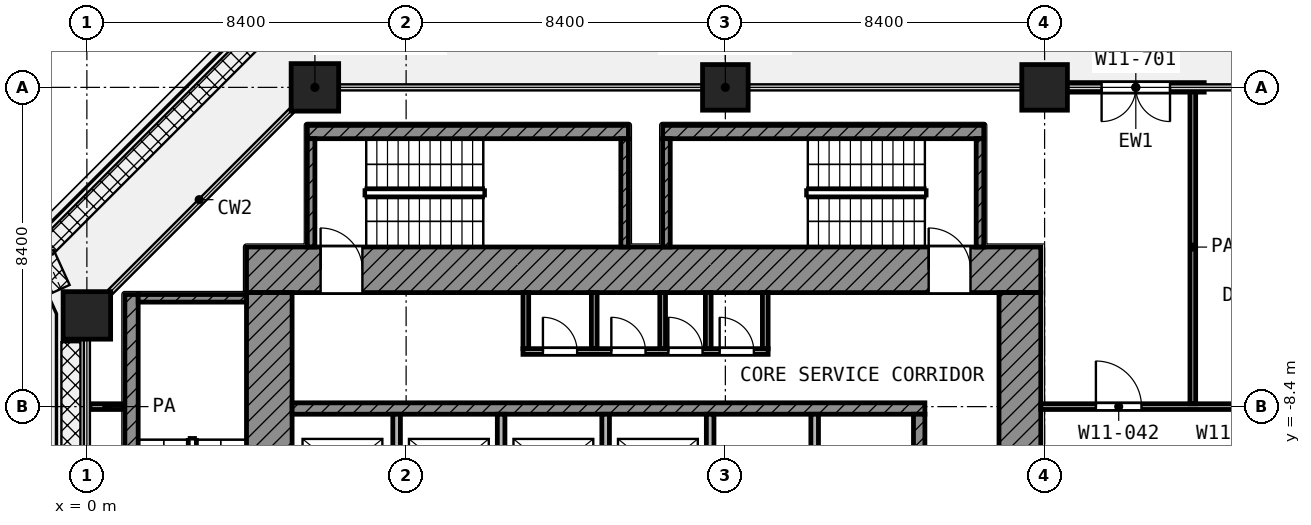
"""IFC4 building model, lengths in metres.
Left out: names, types, materials, properties, quantities, classifications, styles, units other than length and angle.
Written with IfcOpenShell. Run it as: python <this file> out.ifc"""

import sys

from ifc_helpers import new_model, si_unit, direction, frame, frame_2d, origin, origin_2d, place, context, subcontext, project, spatial, rectangle, extrude, element, fill, save


model = new_model("IFC4")
c1 = context("Model", 3, precision=1e-05, world=origin(), true_north=direction((0.0, 1.0)))
c2 = subcontext(c1, "Body", "Model", "MODEL_VIEW")
j1 = project(units=[si_unit("LENGTHUNIT", "METRE"), si_unit("PLANEANGLEUNIT", "RADIAN")], contexts=[c1])
p1 = place(None, origin())
s1 = spatial("IfcSite", under=j1, at=p1, CompositionType="ELEMENT")
p2 = place(p1, origin())
s2 = spatial("IfcBuilding", under=s1, at=p2, CompositionType="ELEMENT")
p3 = place(p2, frame((0.0, 0.0, 72.8)))
s3 = spatial("IfcBuildingStorey", under=s2, at=p3, CompositionType="ELEMENT", Elevation=72.8)
p4 = place(p3, frame((6.0, 0.0, 0.0), z_axis=(0.0, 0.0, 1.0), x_axis=(1.0, 0.0, 0.0)))
e1 = element("IfcColumn", 1, at=p4, inside=s3, PredefinedType="COLUMN", context=c2, shape_type="SweptSolid", body=[
    extrude(rectangle(XDim=1.25, YDim=1.25, at=origin_2d()), origin(), (0.0, 0.0, 1.0), 4.2),
])
for number, where, z_axis, x_axis in (
    (2, (16.8, 0.0, 0.0), (0.0, 0.0, 1.0), (1.0, 0.0, 0.0)),
    (3, (25.2, 0.0, 0.0), (0.0, 0.0, 1.0), (1.0, 0.0, 0.0)),
):
    element("IfcColumn", number, at=place(p3, frame(where, z_axis=z_axis, x_axis=x_axis)), inside=s3, PredefinedType="COLUMN", context=c2, shape_type="SweptSolid", body=[
        extrude(rectangle(XDim=1.2, YDim=1.2, at=origin_2d()), origin(), (0.0, 0.0, 1.0), 4.2),
    ])
p5 = place(p3, frame((0.0, -6.0, 0.0), z_axis=(0.0, 0.0, 1.0), x_axis=(1.0, 0.0, 0.0)))
e4 = element("IfcColumn", 4, at=p5, inside=s3, PredefinedType="COLUMN", context=c2, shape_type="SweptSolid", body=[
    extrude(rectangle(XDim=1.25, YDim=1.25, at=origin_2d()), origin(), (0.0, 0.0, 1.0), 4.2),
])
p6 = place(p3, frame((29.4, 0.0, 0.0), z_axis=(0.0, 0.0, 1.0), x_axis=(-1.0, 0.0, 0.0)))
e5 = element("IfcWall", 5, at=p6, inside=s3, PredefinedType="SOLIDWALL", context=c2, shape_type="SweptSolid", body=[
    extrude(rectangle(XDim=3.6, YDim=0.25, at=frame_2d((1.8, 0.0))), origin(), (0.0, 0.0, 1.0), 3.78),
])
p7 = place(p6, frame((0.9, 0.0, 0.0)))
e6 = element("IfcOpeningElement", 6, at=p7, cuts=e5, PredefinedType="OPENING", context=c2, shape_type="SweptSolid", body=[
    extrude(rectangle(XDim=1.8, YDim=2.1, at=frame_2d((0.9, 1.05))), frame((0.0, 0.135, 0.0), z_axis=(0.0, -1.0, 0.0), x_axis=(1.0, 0.0, 0.0)), (0.0, 0.0, 1.0), 0.27),
])
p8 = place(p3, frame((4.2, -4.8, 0.0), z_axis=(0.0, 0.0, 1.0), x_axis=(1.0, 0.0, 0.0)))
e7 = element("IfcWall", 7, at=p8, inside=s3, PredefinedType="SHEAR", context=c2, shape_type="SweptSolid", body=[
    extrude(rectangle(XDim=20.9, YDim=1.2, at=frame_2d((10.45, 0.0))), origin(), (0.0, 0.0, 1.0), 3.9),
])
p9 = place(p8, frame((1.95, 0.0, 0.0)))
e8 = element("IfcOpeningElement", 8, at=p9, cuts=e7, PredefinedType="OPENING", context=c2, shape_type="SweptSolid", body=[
    extrude(rectangle(XDim=1.1, YDim=2.1, at=frame_2d((0.55, 1.05))), frame((0.0, 0.61, 0.0), z_axis=(0.0, -1.0, 0.0), x_axis=(1.0, 0.0, 0.0)), (0.0, 0.0, 1.0), 1.22),
])
p10 = place(p8, frame((17.95, 0.0, 0.0)))
e9 = element("IfcOpeningElement", 9, at=p10, cuts=e7, PredefinedType="OPENING", context=c2, shape_type="SweptSolid", body=[
    extrude(rectangle(XDim=1.1, YDim=2.1, at=frame_2d((0.55, 1.05))), frame((0.0, 0.61, 0.0), z_axis=(0.0, -1.0, 0.0), x_axis=(1.0, 0.0, 0.0)), (0.0, 0.0, 1.0), 1.22),
])
p11 = place(p3, frame((4.8, -25.1, 0.0), z_axis=(0.0, 0.0, 1.0), x_axis=(0.0, 1.0, 0.0)))
e10 = element("IfcWall", 10, at=p11, inside=s3, PredefinedType="SHEAR", context=c2, shape_type="SweptSolid", body=[
    extrude(rectangle(XDim=19.7, YDim=1.2, at=frame_2d((9.85, 0.0))), origin(), (0.0, 0.0, 1.0), 3.9),
])
p12 = place(p11, frame((11.55, 0.0, 0.0)))
e11 = element("IfcOpeningElement", 11, at=p12, cuts=e10, PredefinedType="OPENING", context=c2, shape_type="SweptSolid", body=[
    extrude(rectangle(XDim=1.1, YDim=2.1, at=frame_2d((0.55, 1.05))), frame((0.0, 0.61, 0.0), z_axis=(0.0, -1.0, 0.0), x_axis=(1.0, 0.0, 0.0)), (0.0, 0.0, 1.0), 1.22),
])
p13 = place(p11, frame((2.25, 0.0, 0.0)))
e12 = element("IfcOpeningElement", 12, at=p13, cuts=e10, PredefinedType="OPENING", context=c2, shape_type="SweptSolid", body=[
    extrude(rectangle(XDim=1.1, YDim=2.1, at=frame_2d((0.55, 1.05))), frame((0.0, 0.61, 0.0), z_axis=(0.0, -1.0, 0.0), x_axis=(1.0, 0.0, 0.0)), (0.0, 0.0, 1.0), 1.22),
])
p14 = place(p3, frame((24.55, -24.0, 0.0), z_axis=(0.0, 0.0, 1.0), x_axis=(0.0, 1.0, 0.0)))
e13 = element("IfcWall", 13, at=p14, inside=s3, PredefinedType="SHEAR", context=c2, shape_type="SweptSolid", body=[
    extrude(rectangle(XDim=18.6, YDim=1.1, at=frame_2d((9.3, 0.0))), origin(), (0.0, 0.0, 1.0), 3.9),
])
p15 = place(p14, frame((10.5, 0.0, 0.0)))
e14 = element("IfcOpeningElement", 14, at=p15, cuts=e13, PredefinedType="OPENING", context=c2, shape_type="SweptSolid", body=[
    extrude(rectangle(XDim=1.8, YDim=2.1, at=frame_2d((0.9, 1.05))), frame((0.0, 0.56, 0.0), z_axis=(0.0, -1.0, 0.0), x_axis=(1.0, 0.0, 0.0)), (0.0, 0.0, 1.0), 1.12),
])
p16 = place(p3, frame((5.4, -8.45, 0.0), z_axis=(0.0, 0.0, 1.0), x_axis=(1.0, 0.0, 0.0)))
e15 = element("IfcWall", 15, at=p16, inside=s3, PredefinedType="SHEAR", context=c2, shape_type="SweptSolid", body=[
    extrude(rectangle(XDim=16.65, YDim=0.3, at=frame_2d((8.325, 0.0))), origin(), (0.0, 0.0, 1.0), 3.9),
])
p17 = place(p3, frame((21.9, -10.95, 0.0), z_axis=(0.0, 0.0, 1.0), x_axis=(0.0, 1.0, 0.0)))
e16 = element("IfcWall", 16, at=p17, inside=s3, PredefinedType="SHEAR", context=c2, shape_type="SweptSolid", body=[
    extrude(rectangle(XDim=2.35, YDim=0.3, at=frame_2d((1.175, 0.0))), origin(), (0.0, 0.0, 1.0), 3.9),
])
for number, where, z_axis, x_axis in (
    (17, (8.15, -10.95, 0.0), (0.0, 0.0, 1.0), (0.0, 1.0, 0.0)),
    (18, (10.9, -10.95, 0.0), (0.0, 0.0, 1.0), (0.0, 1.0, 0.0)),
    (19, (13.65, -10.95, 0.0), (0.0, 0.0, 1.0), (0.0, 1.0, 0.0)),
    (20, (16.4, -10.95, 0.0), (0.0, 0.0, 1.0), (0.0, 1.0, 0.0)),
    (21, (19.15, -10.95, 0.0), (0.0, 0.0, 1.0), (0.0, 1.0, 0.0)),
):
    element("IfcWall", number, at=place(p3, frame(where, z_axis=z_axis, x_axis=x_axis)), inside=s3, PredefinedType="PARTITIONING", context=c2, shape_type="SweptSolid", body=[
        extrude(rectangle(XDim=2.35, YDim=0.2, at=frame_2d((1.175, 0.0))), origin(), (0.0, 0.0, 1.0), 3.9),
    ])
p18 = place(p3, frame((11.475, -6.95, 0.0), z_axis=(0.0, 0.0, 1.0), x_axis=(1.0, 0.0, 0.0)))
e22 = element("IfcWall", 22, at=p18, inside=s3, PredefinedType="PARTITIONING", context=c2, shape_type="SweptSolid", body=[
    extrude(rectangle(XDim=6.45, YDim=0.15, at=frame_2d((3.225, 0.0))), origin(), (0.0, 0.0, 1.0), 3.9),
])
p19 = place(p18, frame((0.525, 0.0, 0.0)))
e23 = element("IfcOpeningElement", 23, at=p19, cuts=e22, PredefinedType="OPENING", context=c2, shape_type="SweptSolid", body=[
    extrude(rectangle(XDim=0.9, YDim=2.1, at=frame_2d((0.45, 1.05))), frame((0.0, 0.085, 0.0), z_axis=(0.0, -1.0, 0.0), x_axis=(1.0, 0.0, 0.0)), (0.0, 0.0, 1.0), 0.17),
])
p20 = place(p18, frame((2.325, 0.0, 0.0)))
e24 = element("IfcOpeningElement", 24, at=p20, cuts=e22, PredefinedType="OPENING", context=c2, shape_type="SweptSolid", body=[
    extrude(rectangle(XDim=0.9, YDim=2.1, at=frame_2d((0.45, 1.05))), frame((0.0, 0.085, 0.0), z_axis=(0.0, -1.0, 0.0), x_axis=(1.0, 0.0, 0.0)), (0.0, 0.0, 1.0), 0.17),
])
p21 = place(p18, frame((3.825, 0.0, 0.0)))
e25 = element("IfcOpeningElement", 25, at=p21, cuts=e22, PredefinedType="OPENING", context=c2, shape_type="SweptSolid", body=[
    extrude(rectangle(XDim=0.9, YDim=2.1, at=frame_2d((0.45, 1.05))), frame((0.0, 0.085, 0.0), z_axis=(0.0, -1.0, 0.0), x_axis=(1.0, 0.0, 0.0)), (0.0, 0.0, 1.0), 0.17),
])
p22 = place(p18, frame((5.175, 0.0, 0.0)))
e26 = element("IfcOpeningElement", 26, at=p22, cuts=e22, PredefinedType="OPENING", context=c2, shape_type="SweptSolid", body=[
    extrude(rectangle(XDim=0.9, YDim=2.1, at=frame_2d((0.45, 1.05))), frame((0.0, 0.085, 0.0), z_axis=(0.0, -1.0, 0.0), x_axis=(1.0, 0.0, 0.0)), (0.0, 0.0, 1.0), 0.17),
])
for number, where, z_axis, x_axis in (
    (27, (11.55, -6.875, 0.0), (0.0, 0.0, 1.0), (0.0, 1.0, 0.0)),
    (28, (13.35, -6.875, 0.0), (0.0, 0.0, 1.0), (0.0, 1.0, 0.0)),
    (29, (15.15, -6.875, 0.0), (0.0, 0.0, 1.0), (0.0, 1.0, 0.0)),
    (30, (16.35, -6.875, 0.0), (0.0, 0.0, 1.0), (0.0, 1.0, 0.0)),
    (31, (17.85, -6.875, 0.0), (0.0, 0.0, 1.0), (0.0, 1.0, 0.0)),
):
    element("IfcWall", number, at=place(p3, frame(where, z_axis=z_axis, x_axis=x_axis)), inside=s3, PredefinedType="PARTITIONING", context=c2, shape_type="SweptSolid", body=[
        extrude(rectangle(XDim=1.475, YDim=0.15, at=frame_2d((0.738, 0.0))), origin(), (0.0, 0.0, 1.0), 3.9),
    ])
p23 = place(p3, frame((1.175, -13.9, 0.0), z_axis=(0.0, 0.0, 1.0), x_axis=(0.0, 1.0, 0.0)))
e32 = element("IfcWall", 32, at=p23, inside=s3, PredefinedType="SHEAR", context=c2, shape_type="SweptSolid", body=[
    extrude(rectangle(XDim=8.45, YDim=0.35, at=frame_2d((4.225, 0.0))), origin(), (0.0, 0.0, 1.0), 3.9),
])
p24 = place(p3, frame((1.35, -5.55, 0.0), z_axis=(0.0, 0.0, 1.0), x_axis=(1.0, 0.0, 0.0)))
e33 = element("IfcWall", 33, at=p24, inside=s3, PredefinedType="SHEAR", context=c2, shape_type="SweptSolid", body=[
    extrude(rectangle(XDim=2.85, YDim=0.2, at=frame_2d((1.425, 0.0))), origin(), (0.0, 0.0, 1.0), 3.9),
])
p25 = place(p3, frame((5.8, -1.175, 0.0), z_axis=(0.0, 0.0, 1.0), x_axis=(1.0, 0.0, 0.0)))
e34 = element("IfcWall", 34, at=p25, inside=s3, PredefinedType="SHEAR", context=c2, shape_type="SweptSolid", body=[
    extrude(rectangle(XDim=8.45, YDim=0.35, at=frame_2d((4.225, 0.0))), origin(), (0.0, 0.0, 1.0), 3.9),
])
for number, where, z_axis, x_axis in (
    (35, (5.9, -4.2, 0.0), (0.0, 0.0, 1.0), (0.0, 1.0, 0.0)),
    (36, (14.15, -4.2, 0.0), (0.0, 0.0, 1.0), (0.0, 1.0, 0.0)),
):
    element("IfcWall", number, at=place(p3, frame(where, z_axis=z_axis, x_axis=x_axis)), inside=s3, PredefinedType="SHEAR", context=c2, shape_type="SweptSolid", body=[
        extrude(rectangle(XDim=2.85, YDim=0.2, at=frame_2d((1.425, 0.0))), origin(), (0.0, 0.0, 1.0), 3.9),
    ])
p26 = place(p3, frame((15.15, -1.175, 0.0), z_axis=(0.0, 0.0, 1.0), x_axis=(1.0, 0.0, 0.0)))
e37 = element("IfcWall", 37, at=p26, inside=s3, PredefinedType="SHEAR", context=c2, shape_type="SweptSolid", body=[
    extrude(rectangle(XDim=8.45, YDim=0.35, at=frame_2d((4.225, 0.0))), origin(), (0.0, 0.0, 1.0), 3.9),
])
for number, where, z_axis, x_axis in (
    (38, (15.25, -4.2, 0.0), (0.0, 0.0, 1.0), (0.0, 1.0, 0.0)),
    (39, (23.5, -4.2, 0.0), (0.0, 0.0, 1.0), (0.0, 1.0, 0.0)),
):
    element("IfcWall", number, at=place(p3, frame(where, z_axis=z_axis, x_axis=x_axis)), inside=s3, PredefinedType="SHEAR", context=c2, shape_type="SweptSolid", body=[
        extrude(rectangle(XDim=2.85, YDim=0.2, at=frame_2d((1.425, 0.0))), origin(), (0.0, 0.0, 1.0), 3.9),
    ])
p27 = place(p3, frame((0.08, -8.4, 0.0), z_axis=(0.0, 0.0, 1.0), x_axis=(1.0, 0.0, 0.0)))
e40 = element("IfcWall", 40, at=p27, inside=s3, PredefinedType="PARTITIONING", context=c2, shape_type="SweptSolid", body=[
    extrude(rectangle(XDim=0.89, YDim=0.15, at=frame_2d((0.445, 0.0))), origin(), (0.0, 0.0, 1.0), 3.9),
])
p28 = place(p3, frame((25.1, -8.4, 0.0), z_axis=(0.0, 0.0, 1.0), x_axis=(1.0, 0.0, 0.0)))
e41 = element("IfcWall", 41, at=p28, inside=s3, PredefinedType="PARTITIONING", context=c2, shape_type="SweptSolid", body=[
    extrude(rectangle(XDim=14.932, YDim=0.15, at=frame_2d((7.466, 0.0))), origin(), (0.0, 0.0, 1.0), 3.9),
])
p29 = place(p28, frame((1.45, 0.0, 0.0)))
e42 = element("IfcOpeningElement", 42, at=p29, cuts=e41, PredefinedType="OPENING", context=c2, shape_type="SweptSolid", body=[
    extrude(rectangle(XDim=1.2, YDim=2.1, at=frame_2d((0.6, 1.05))), frame((0.0, 0.085, 0.0), z_axis=(0.0, -1.0, 0.0), x_axis=(1.0, 0.0, 0.0)), (0.0, 0.0, 1.0), 0.17),
])
p30 = place(p28, frame((5.75, 0.0, 0.0)))
e43 = element("IfcOpeningElement", 43, at=p30, cuts=e41, PredefinedType="OPENING", context=c2, shape_type="SweptSolid", body=[
    extrude(rectangle(XDim=1.0, YDim=2.1, at=frame_2d((0.5, 1.05))), frame((0.0, 0.085, 0.0), z_axis=(0.0, -1.0, 0.0), x_axis=(1.0, 0.0, 0.0)), (0.0, 0.0, 1.0), 0.17),
])
p31 = place(p28, frame((9.2, 0.0, 0.0)))
e44 = element("IfcOpeningElement", 44, at=p31, cuts=e41, PredefinedType="OPENING", context=c2, shape_type="SweptSolid", body=[
    extrude(rectangle(XDim=1.2, YDim=2.1, at=frame_2d((0.6, 1.05))), frame((0.0, 0.085, 0.0), z_axis=(0.0, -1.0, 0.0), x_axis=(1.0, 0.0, 0.0)), (0.0, 0.0, 1.0), 0.17),
])
p32 = place(p3, frame((29.1, -8.325, 0.0), z_axis=(0.0, 0.0, 1.0), x_axis=(0.0, 1.0, 0.0)))
e45 = element("IfcWall", 45, at=p32, inside=s3, PredefinedType="PARTITIONING", context=c2, shape_type="SweptSolid", body=[
    extrude(rectangle(XDim=8.245, YDim=0.15, at=frame_2d((4.123, 0.0))), origin(), (0.0, 0.0, 1.0), 3.9),
])
p33 = place(p7, origin())
e46 = element("IfcDoor", 46, at=p33, inside=s3, OperationType="DOUBLE_DOOR_SINGLE_SWING", PredefinedType="DOOR", context=c2, shape_type="SweptSolid", body=[
    extrude(rectangle(XDim=1.8, YDim=2.1, at=frame_2d((0.9, 1.05))), frame((0.0, 0.025, 0.0), z_axis=(0.0, -1.0, 0.0), x_axis=(1.0, 0.0, 0.0)), (0.0, 0.0, 1.0), 0.05),
])
fill(e6, e46)
p34 = place(p9, origin())
e47 = element("IfcDoor", 47, at=p34, inside=s3, OperationType="SINGLE_SWING_LEFT", PredefinedType="DOOR", context=c2, shape_type="SweptSolid", body=[
    extrude(rectangle(XDim=1.1, YDim=2.1, at=frame_2d((0.55, 1.05))), frame((0.0, 0.025, 0.0), z_axis=(0.0, -1.0, 0.0), x_axis=(1.0, 0.0, 0.0)), (0.0, 0.0, 1.0), 0.05),
])
fill(e8, e47)
p35 = place(p10, origin())
e48 = element("IfcDoor", 48, at=p35, inside=s3, OperationType="SINGLE_SWING_LEFT", PredefinedType="DOOR", context=c2, shape_type="SweptSolid", body=[
    extrude(rectangle(XDim=1.1, YDim=2.1, at=frame_2d((0.55, 1.05))), frame((0.0, 0.025, 0.0), z_axis=(0.0, -1.0, 0.0), x_axis=(1.0, 0.0, 0.0)), (0.0, 0.0, 1.0), 0.05),
])
fill(e9, e48)
p36 = place(p19, origin())
e49 = element("IfcDoor", 49, at=p36, inside=s3, OperationType="SINGLE_SWING_LEFT", PredefinedType="DOOR", context=c2, shape_type="SweptSolid", body=[
    extrude(rectangle(XDim=0.9, YDim=2.1, at=frame_2d((0.45, 1.05))), frame((0.0, 0.025, 0.0), z_axis=(0.0, -1.0, 0.0), x_axis=(1.0, 0.0, 0.0)), (0.0, 0.0, 1.0), 0.05),
])
fill(e23, e49)
p37 = place(p20, origin())
e50 = element("IfcDoor", 50, at=p37, inside=s3, OperationType="SINGLE_SWING_LEFT", PredefinedType="DOOR", context=c2, shape_type="SweptSolid", body=[
    extrude(rectangle(XDim=0.9, YDim=2.1, at=frame_2d((0.45, 1.05))), frame((0.0, 0.025, 0.0), z_axis=(0.0, -1.0, 0.0), x_axis=(1.0, 0.0, 0.0)), (0.0, 0.0, 1.0), 0.05),
])
fill(e24, e50)
p38 = place(p21, origin())
e51 = element("IfcDoor", 51, at=p38, inside=s3, OperationType="SINGLE_SWING_LEFT", PredefinedType="DOOR", context=c2, shape_type="SweptSolid", body=[
    extrude(rectangle(XDim=0.9, YDim=2.1, at=frame_2d((0.45, 1.05))), frame((0.0, 0.025, 0.0), z_axis=(0.0, -1.0, 0.0), x_axis=(1.0, 0.0, 0.0)), (0.0, 0.0, 1.0), 0.05),
])
fill(e25, e51)
p39 = place(p22, origin())
e52 = element("IfcDoor", 52, at=p39, inside=s3, OperationType="SINGLE_SWING_LEFT", PredefinedType="DOOR", context=c2, shape_type="SweptSolid", body=[
    extrude(rectangle(XDim=0.9, YDim=2.1, at=frame_2d((0.45, 1.05))), frame((0.0, 0.025, 0.0), z_axis=(0.0, -1.0, 0.0), x_axis=(1.0, 0.0, 0.0)), (0.0, 0.0, 1.0), 0.05),
])
fill(e26, e52)
p40 = place(p29, origin())
e53 = element("IfcDoor", 53, at=p40, inside=s3, OperationType="SINGLE_SWING_LEFT", PredefinedType="DOOR", context=c2, shape_type="SweptSolid", body=[
    extrude(rectangle(XDim=1.2, YDim=2.1, at=frame_2d((0.6, 1.05))), frame((0.0, 0.025, 0.0), z_axis=(0.0, -1.0, 0.0), x_axis=(1.0, 0.0, 0.0)), (0.0, 0.0, 1.0), 0.05),
])
fill(e42, e53)
save(model, sys.argv[1])
